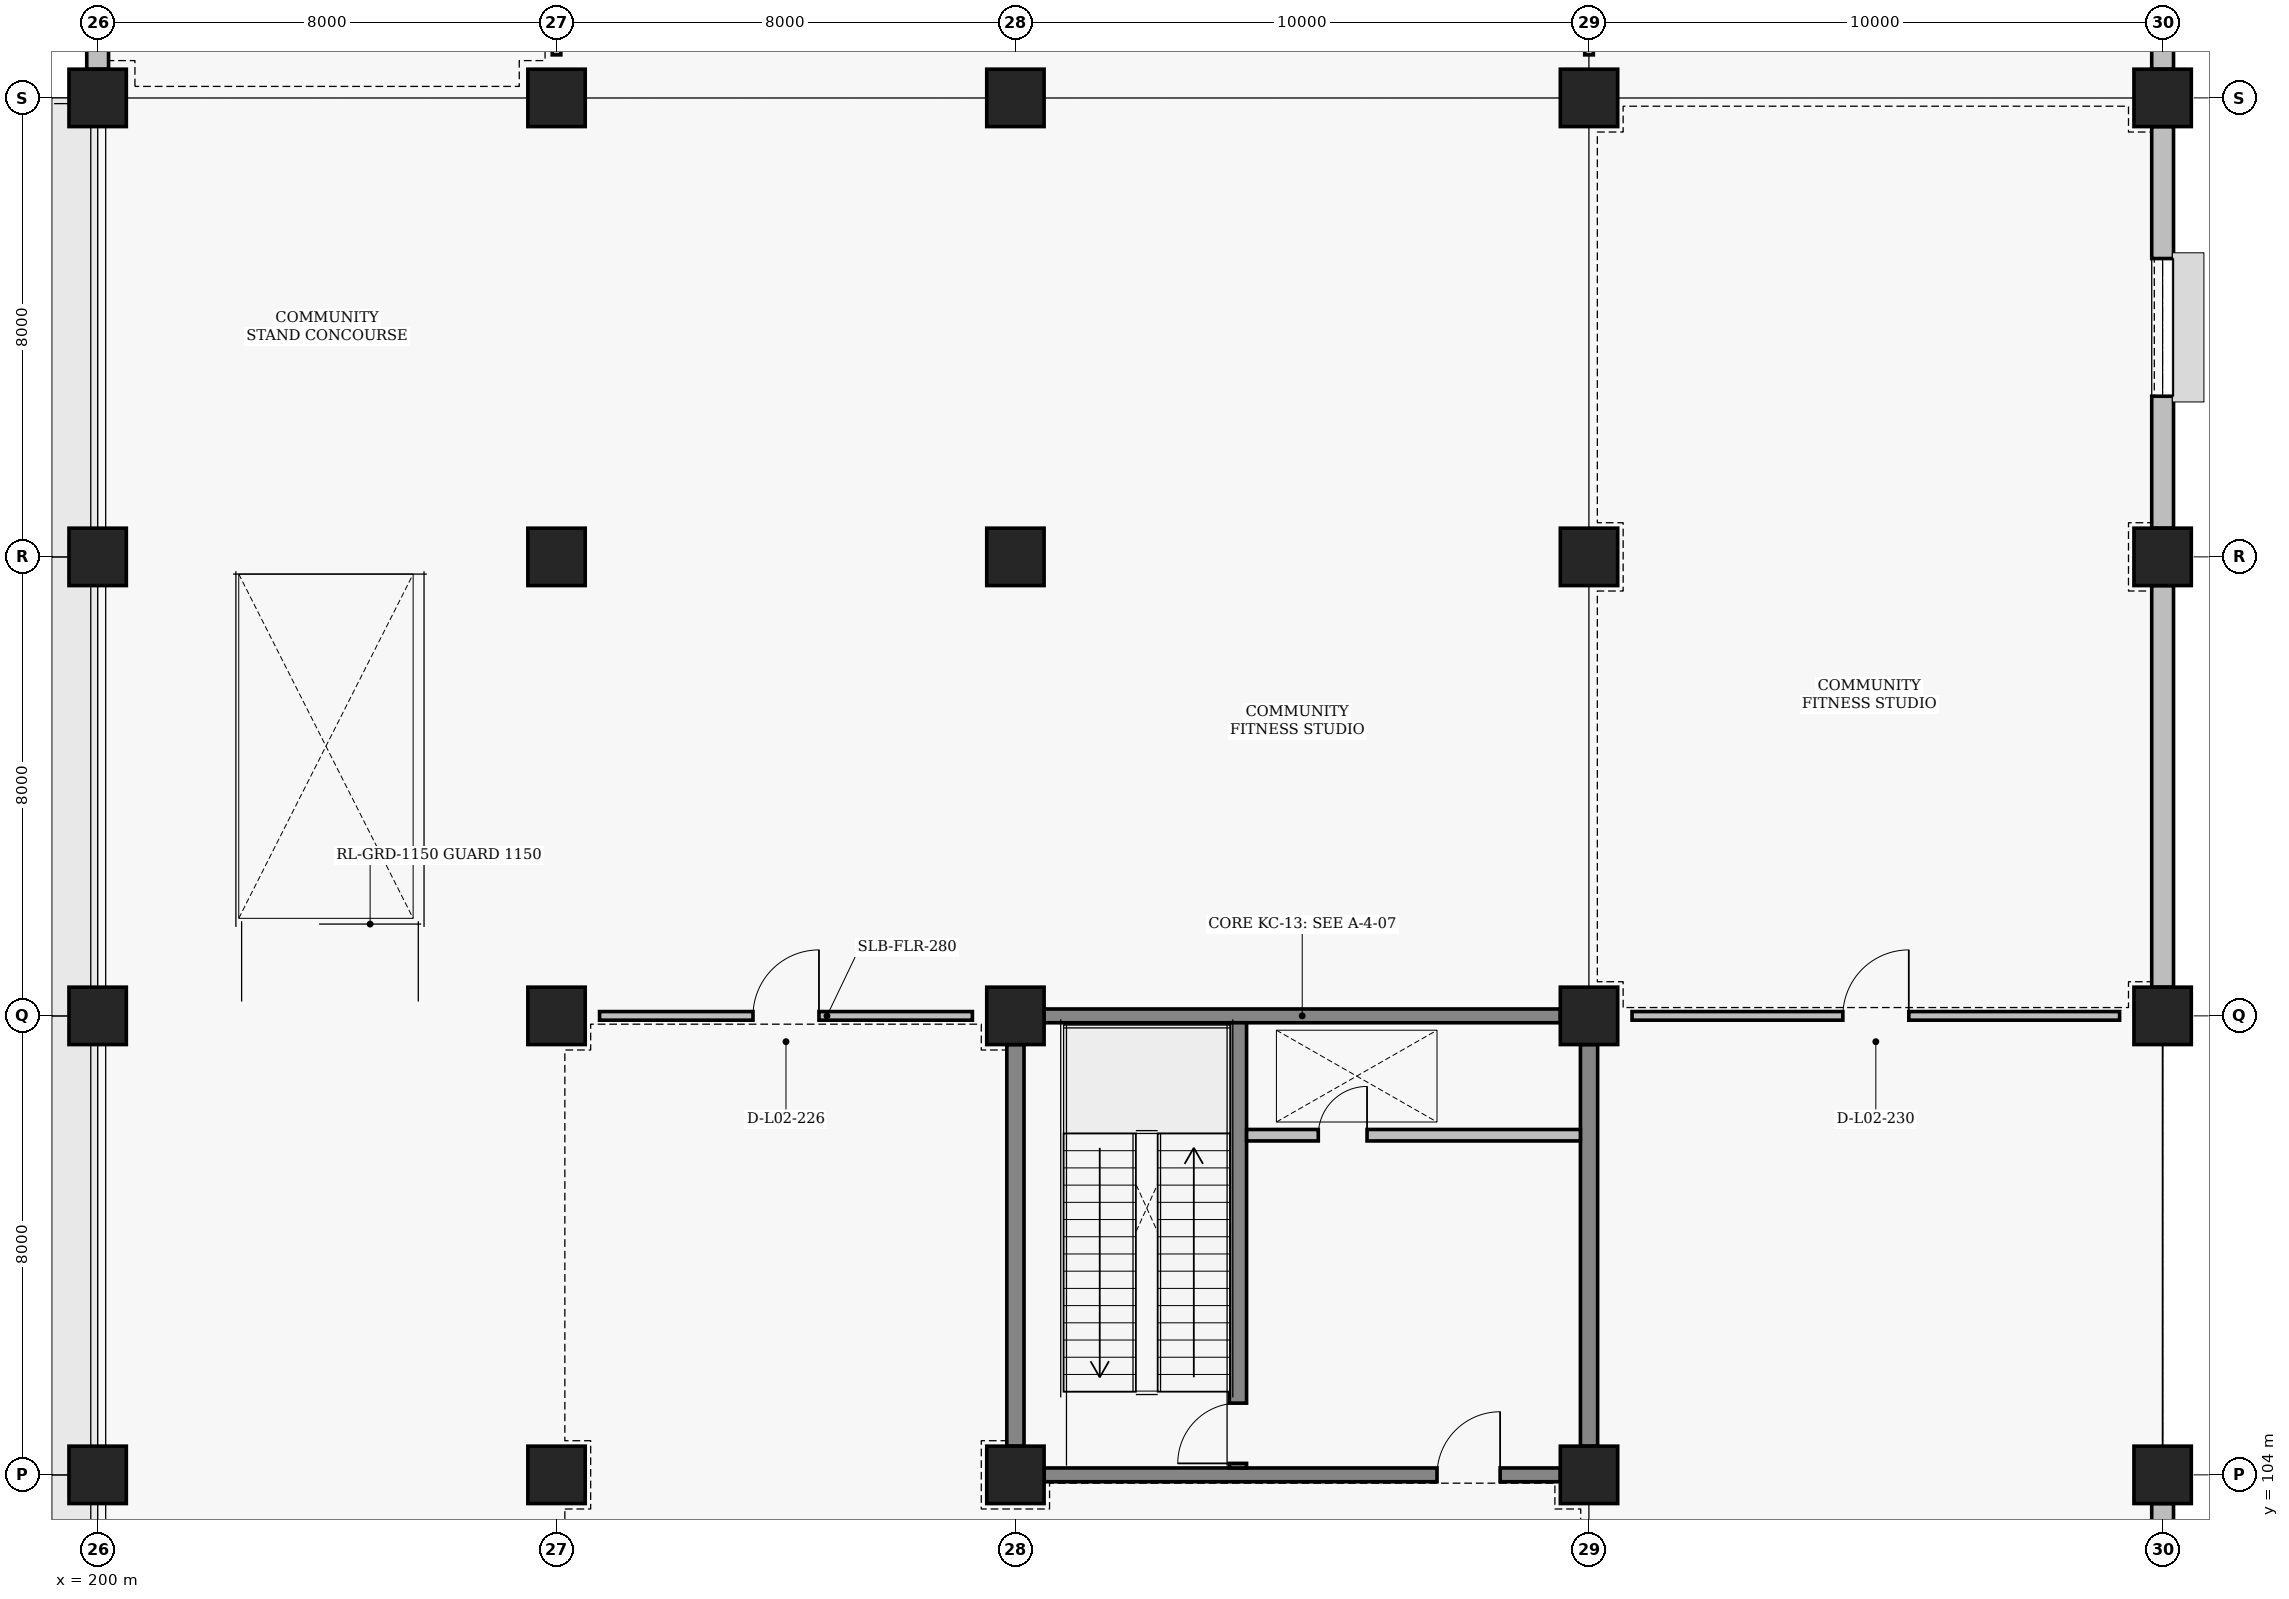
"""IFC4 building model, lengths in metres.
Left out: names, types, materials, properties, quantities, classifications, styles, units other than length and angle.
Written with IfcOpenShell. Run it as: python <this file> out.ifc"""

import sys

from ifc_helpers import new_model, si_unit, direction, frame, frame_2d, origin, origin_2d, place, context, subcontext, project, spatial, rectangle, extrude, element, fill, save


model = new_model("IFC4")
c1 = context("Model", 3, precision=1e-05, world=origin(), true_north=direction((0.0, 1.0)))
c2 = subcontext(c1, "Body", "Model", "MODEL_VIEW")
j1 = project(units=[si_unit("LENGTHUNIT", "METRE"), si_unit("PLANEANGLEUNIT", "RADIAN")], contexts=[c1])
p1 = place(None, origin())
s1 = spatial("IfcSite", under=j1, at=p1, CompositionType="ELEMENT")
p2 = place(p1, origin())
s2 = spatial("IfcBuilding", under=s1, at=p2, CompositionType="ELEMENT")
p3 = place(p2, frame((0.0, 0.0, 4.8)))
s3 = spatial("IfcBuildingStorey", under=s2, at=p3, CompositionType="ELEMENT", Elevation=4.8)
for number, where, z_axis, x_axis in (
    (1, (200.0, 104.0, 0.0), (0.0, 0.0, 1.0), (1.0, 0.0, 0.0)),
    (2, (200.0, 112.0, 0.0), (0.0, 0.0, 1.0), (1.0, 0.0, 0.0)),
    (3, (200.0, 120.0, 0.0), (0.0, 0.0, 1.0), (1.0, 0.0, 0.0)),
    (4, (200.0, 128.0, 0.0), (0.0, 0.0, 1.0), (1.0, 0.0, 0.0)),
    (5, (208.0, 104.0, 0.0), (0.0, 0.0, 1.0), (1.0, 0.0, 0.0)),
    (6, (208.0, 112.0, 0.0), (0.0, 0.0, 1.0), (1.0, 0.0, 0.0)),
    (7, (208.0, 120.0, 0.0), (0.0, 0.0, 1.0), (1.0, 0.0, 0.0)),
    (8, (208.0, 128.0, 0.0), (0.0, 0.0, 1.0), (1.0, 0.0, 0.0)),
    (9, (216.0, 104.0, 0.0), (0.0, 0.0, 1.0), (1.0, 0.0, 0.0)),
    (10, (216.0, 112.0, 0.0), (0.0, 0.0, 1.0), (1.0, 0.0, 0.0)),
    (11, (216.0, 120.0, 0.0), (0.0, 0.0, 1.0), (1.0, 0.0, 0.0)),
    (12, (216.0, 128.0, 0.0), (0.0, 0.0, 1.0), (1.0, 0.0, 0.0)),
    (13, (226.0, 104.0, 0.0), (0.0, 0.0, 1.0), (1.0, 0.0, 0.0)),
    (14, (226.0, 112.0, 0.0), (0.0, 0.0, 1.0), (1.0, 0.0, 0.0)),
    (15, (226.0, 120.0, 0.0), (0.0, 0.0, 1.0), (1.0, 0.0, 0.0)),
    (16, (226.0, 128.0, 0.0), (0.0, 0.0, 1.0), (1.0, 0.0, 0.0)),
    (17, (236.0, 104.0, 0.0), (0.0, 0.0, 1.0), (1.0, 0.0, 0.0)),
    (18, (236.0, 112.0, 0.0), (0.0, 0.0, 1.0), (1.0, 0.0, 0.0)),
    (19, (236.0, 120.0, 0.0), (0.0, 0.0, 1.0), (1.0, 0.0, 0.0)),
    (20, (236.0, 128.0, 0.0), (0.0, 0.0, 1.0), (1.0, 0.0, 0.0)),
):
    element("IfcColumn", number, at=place(p3, frame(where, z_axis=z_axis, x_axis=x_axis)), inside=s3, PredefinedType="COLUMN", context=c2, shape_type="SweptSolid", body=[
        extrude(rectangle(XDim=1.0, YDim=1.0, at=origin_2d()), origin(), (0.0, 0.0, 1.0), 4.8),
    ])
p4 = place(p3, frame((200.0, 128.5, 0.0), z_axis=(0.0, 0.0, 1.0), x_axis=(0.0, 1.0, 0.0)))
e21 = element("IfcWall", 21, at=p4, inside=s3, PredefinedType="SOLIDWALL", context=c2, shape_type="SweptSolid", body=[
    extrude(rectangle(XDim=7.05, YDim=0.38, at=frame_2d((3.525, 0.0))), origin(), (0.0, 0.0, 1.0), 3.61),
])
for number, where, z_axis, x_axis in (
    (22, (236.0, 96.5, 0.0), (0.0, 0.0, 1.0), (0.0, 1.0, 0.0)),
    (23, (236.0, 112.5, 0.0), (0.0, 0.0, 1.0), (0.0, 1.0, 0.0)),
):
    element("IfcWall", number, at=place(p3, frame(where, z_axis=z_axis, x_axis=x_axis)), inside=s3, PredefinedType="SOLIDWALL", context=c2, shape_type="SweptSolid", body=[
        extrude(rectangle(XDim=7.0, YDim=0.38, at=frame_2d((3.5, 0.0))), origin(), (0.0, 0.0, 1.0), 3.81),
    ])
p5 = place(p3, frame((236.0, 120.5, 0.0), z_axis=(0.0, 0.0, 1.0), x_axis=(0.0, 1.0, 0.0)))
e24 = element("IfcWall", 24, at=p5, inside=s3, PredefinedType="SOLIDWALL", context=c2, shape_type="SweptSolid", body=[
    extrude(rectangle(XDim=7.0, YDim=0.38, at=frame_2d((3.5, 0.0))), origin(), (0.0, 0.0, 1.0), 3.81),
])
p6 = place(p5, frame((2.3, 0.0, 1.9)))
e25 = element("IfcOpeningElement", 25, at=p6, cuts=e24, PredefinedType="OPENING", context=c2, shape_type="SweptSolid", body=[
    extrude(rectangle(XDim=2.4, YDim=1.1, at=frame_2d((1.2, 0.55))), frame((0.0, 0.2, 0.0), z_axis=(0.0, -1.0, 0.0), x_axis=(1.0, 0.0, 0.0)), (0.0, 0.0, 1.0), 0.4),
])
p7 = place(p3, frame((236.0, 128.5, 0.0), z_axis=(0.0, 0.0, 1.0), x_axis=(0.0, 1.0, 0.0)))
e26 = element("IfcWall", 26, at=p7, inside=s3, PredefinedType="SOLIDWALL", context=c2, shape_type="SweptSolid", body=[
    extrude(rectangle(XDim=7.0, YDim=0.38, at=frame_2d((3.5, 0.0))), origin(), (0.0, 0.0, 1.0), 3.81),
])
p8 = place(p3, frame((216.5, 104.0, 0.0), z_axis=(0.0, 0.0, 1.0), x_axis=(1.0, 0.0, 0.0)))
e27 = element("IfcWall", 27, at=p8, inside=s3, PredefinedType="SHEAR", context=c2, shape_type="SweptSolid", body=[
    extrude(rectangle(XDim=9.0, YDim=0.24, at=frame_2d((4.5, 0.0))), origin(), (0.0, 0.0, 1.0), 3.81),
])
p9 = place(p8, frame((6.85, 0.0, 0.0)))
e28 = element("IfcOpeningElement", 28, at=p9, cuts=e27, PredefinedType="OPENING", context=c2, shape_type="SweptSolid", body=[
    extrude(rectangle(XDim=1.1, YDim=2.2, at=frame_2d((0.55, 1.1))), frame((0.0, 0.13, 0.0), z_axis=(0.0, -1.0, 0.0), x_axis=(1.0, 0.0, 0.0)), (0.0, 0.0, 1.0), 0.26),
])
p10 = place(p3, frame((216.5, 112.0, 0.0), z_axis=(0.0, 0.0, 1.0), x_axis=(1.0, 0.0, 0.0)))
e29 = element("IfcWall", 29, at=p10, inside=s3, PredefinedType="SHEAR", context=c2, shape_type="SweptSolid", body=[
    extrude(rectangle(XDim=9.0, YDim=0.24, at=frame_2d((4.5, 0.0))), origin(), (0.0, 0.0, 1.0), 3.81),
])
p11 = place(p3, frame((216.0, 104.5, 0.0), z_axis=(0.0, 0.0, 1.0), x_axis=(0.0, 1.0, 0.0)))
e30 = element("IfcWall", 30, at=p11, inside=s3, PredefinedType="SHEAR", context=c2, shape_type="SweptSolid", body=[
    extrude(rectangle(XDim=7.0, YDim=0.3, at=frame_2d((3.5, 0.0))), origin(), (0.0, 0.0, 1.0), 3.91),
])
p12 = place(p3, frame((226.0, 104.5, 0.0), z_axis=(0.0, 0.0, 1.0), x_axis=(0.0, 1.0, 0.0)))
e31 = element("IfcWall", 31, at=p12, inside=s3, PredefinedType="SHEAR", context=c2, shape_type="SweptSolid", body=[
    extrude(rectangle(XDim=7.0, YDim=0.3, at=frame_2d((3.5, 0.0))), origin(), (0.0, 0.0, 1.0), 3.81),
])
p13 = place(p3, frame((219.88, 104.12, 0.0), z_axis=(0.0, 0.0, 1.0), x_axis=(0.0, 1.0, 0.0)))
e32 = element("IfcWall", 32, at=p13, inside=s3, PredefinedType="SHEAR", context=c2, shape_type="SweptSolid", body=[
    extrude(rectangle(XDim=7.76, YDim=0.3, at=frame_2d((3.88, 0.0))), origin(), (0.0, 0.0, 1.0), 4.01),
])
p14 = place(p13, frame((0.08, 0.0, 0.0)))
e33 = element("IfcOpeningElement", 33, at=p14, cuts=e32, PredefinedType="OPENING", context=c2, shape_type="SweptSolid", body=[
    extrude(rectangle(XDim=1.05, YDim=2.15, at=frame_2d((0.525, 1.075))), frame((0.0, 0.16, 0.0), z_axis=(0.0, -1.0, 0.0), x_axis=(1.0, 0.0, 0.0)), (0.0, 0.0, 1.0), 0.32),
])
p15 = place(p3, frame((220.03, 109.92, 0.0), z_axis=(0.0, 0.0, 1.0), x_axis=(1.0, 0.0, 0.0)))
e34 = element("IfcWall", 34, at=p15, inside=s3, PredefinedType="PARTITIONING", context=c2, shape_type="SweptSolid", body=[
    extrude(rectangle(XDim=5.82, YDim=0.2, at=frame_2d((2.91, 0.0))), origin(), (0.0, 0.0, 1.0), 3.91),
])
p16 = place(p15, frame((1.25, 0.0, 0.0)))
e35 = element("IfcOpeningElement", 35, at=p16, cuts=e34, PredefinedType="OPENING", context=c2, shape_type="SweptSolid", body=[
    extrude(rectangle(XDim=0.85, YDim=2.05, at=frame_2d((0.425, 1.025))), frame((0.0, 0.11, 0.0), z_axis=(0.0, -1.0, 0.0), x_axis=(1.0, 0.0, 0.0)), (0.0, 0.0, 1.0), 0.22),
])
p17 = place(p3, frame((208.0, 128.75, 0.0), z_axis=(0.0, 0.0, 1.0), x_axis=(0.0, 1.0, 0.0)))
e36 = element("IfcWall", 36, at=p17, inside=s3, PredefinedType="PARTITIONING", context=c2, shape_type="SweptSolid", body=[
    extrude(rectangle(XDim=6.5, YDim=0.15, at=frame_2d((3.25, 0.0))), origin(), (0.0, 0.0, 1.0), 3.91),
])
p18 = place(p17, frame((2.675, 0.0, 0.0)))
e37 = element("IfcOpeningElement", 37, at=p18, cuts=e36, PredefinedType="OPENING", context=c2, shape_type="SweptSolid", body=[
    extrude(rectangle(XDim=1.15, YDim=2.15, at=frame_2d((0.575, 1.075))), frame((0.0, 0.085, 0.0), z_axis=(0.0, -1.0, 0.0), x_axis=(1.0, 0.0, 0.0)), (0.0, 0.0, 1.0), 0.17),
])
p19 = place(p3, frame((208.75, 112.0, 0.0), z_axis=(0.0, 0.0, 1.0), x_axis=(1.0, 0.0, 0.0)))
e38 = element("IfcWall", 38, at=p19, inside=s3, PredefinedType="PARTITIONING", context=c2, shape_type="SweptSolid", body=[
    extrude(rectangle(XDim=6.5, YDim=0.15, at=frame_2d((3.25, 0.0))), origin(), (0.0, 0.0, 1.0), 3.91),
])
p20 = place(p19, frame((2.675, 0.0, 0.0)))
e39 = element("IfcOpeningElement", 39, at=p20, cuts=e38, PredefinedType="OPENING", context=c2, shape_type="SweptSolid", body=[
    extrude(rectangle(XDim=1.15, YDim=2.15, at=frame_2d((0.575, 1.075))), frame((0.0, 0.085, 0.0), z_axis=(0.0, -1.0, 0.0), x_axis=(1.0, 0.0, 0.0)), (0.0, 0.0, 1.0), 0.17),
])
p21 = place(p3, frame((226.75, 112.0, 0.0), z_axis=(0.0, 0.0, 1.0), x_axis=(1.0, 0.0, 0.0)))
e40 = element("IfcWall", 40, at=p21, inside=s3, PredefinedType="PARTITIONING", context=c2, shape_type="SweptSolid", body=[
    extrude(rectangle(XDim=8.5, YDim=0.15, at=frame_2d((4.25, 0.0))), origin(), (0.0, 0.0, 1.0), 3.81),
])
p22 = place(p21, frame((3.675, 0.0, 0.0)))
e41 = element("IfcOpeningElement", 41, at=p22, cuts=e40, PredefinedType="OPENING", context=c2, shape_type="SweptSolid", body=[
    extrude(rectangle(XDim=1.15, YDim=2.15, at=frame_2d((0.575, 1.075))), frame((0.0, 0.085, 0.0), z_axis=(0.0, -1.0, 0.0), x_axis=(1.0, 0.0, 0.0)), (0.0, 0.0, 1.0), 0.17),
])
p23 = place(p3, frame((226.0, 128.75, 0.0), z_axis=(0.0, 0.0, 1.0), x_axis=(0.0, 1.0, 0.0)))
e42 = element("IfcWall", 42, at=p23, inside=s3, PredefinedType="PARTITIONING", context=c2, shape_type="SweptSolid", body=[
    extrude(rectangle(XDim=6.5, YDim=0.15, at=frame_2d((3.25, 0.0))), origin(), (0.0, 0.0, 1.0), 3.91),
])
p24 = place(p23, frame((2.675, 0.0, 0.0)))
e43 = element("IfcOpeningElement", 43, at=p24, cuts=e42, PredefinedType="OPENING", context=c2, shape_type="SweptSolid", body=[
    extrude(rectangle(XDim=1.15, YDim=2.15, at=frame_2d((0.575, 1.075))), frame((0.0, 0.085, 0.0), z_axis=(0.0, -1.0, 0.0), x_axis=(1.0, 0.0, 0.0)), (0.0, 0.0, 1.0), 0.17),
])
p25 = place(p6, origin())
e44 = element("IfcWindow", 44, at=p25, inside=s3, PartitioningType="SINGLE_PANEL", PredefinedType="LIGHTDOME", context=c2, shape_type="SweptSolid", body=[
    extrude(rectangle(XDim=2.4, YDim=1.1, at=frame_2d((1.2, 0.55))), frame((0.0, 0.03, 0.0), z_axis=(0.0, -1.0, 0.0), x_axis=(1.0, 0.0, 0.0)), (0.0, 0.0, 1.0), 0.06),
])
fill(e25, e44)
p26 = place(p9, origin())
e45 = element("IfcDoor", 45, at=p26, inside=s3, OperationType="SINGLE_SWING_RIGHT", PredefinedType="DOOR", context=c2, shape_type="SweptSolid", body=[
    extrude(rectangle(XDim=1.1, YDim=2.2, at=frame_2d((0.55, 1.1))), frame((0.0, 0.025, 0.0), z_axis=(0.0, -1.0, 0.0), x_axis=(1.0, 0.0, 0.0)), (0.0, 0.0, 1.0), 0.05),
])
fill(e28, e45)
p27 = place(p14, origin())
e46 = element("IfcDoor", 46, at=p27, inside=s3, OperationType="SINGLE_SWING_LEFT", PredefinedType="DOOR", context=c2, shape_type="SweptSolid", body=[
    extrude(rectangle(XDim=1.05, YDim=2.15, at=frame_2d((0.525, 1.075))), frame((0.0, 0.025, 0.0), z_axis=(0.0, -1.0, 0.0), x_axis=(1.0, 0.0, 0.0)), (0.0, 0.0, 1.0), 0.05),
])
fill(e33, e46)
p28 = place(p16, origin())
e47 = element("IfcDoor", 47, at=p28, inside=s3, OperationType="SINGLE_SWING_RIGHT", PredefinedType="TRAPDOOR", context=c2, shape_type="SweptSolid", body=[
    extrude(rectangle(XDim=0.85, YDim=2.05, at=frame_2d((0.425, 1.025))), frame((0.0, 0.025, 0.0), z_axis=(0.0, -1.0, 0.0), x_axis=(1.0, 0.0, 0.0)), (0.0, 0.0, 1.0), 0.05),
])
fill(e35, e47)
p29 = place(p20, origin())
e48 = element("IfcDoor", 48, at=p29, inside=s3, OperationType="SINGLE_SWING_RIGHT", PredefinedType="DOOR", context=c2, shape_type="SweptSolid", body=[
    extrude(rectangle(XDim=1.15, YDim=2.15, at=frame_2d((0.575, 1.075))), frame((0.0, 0.025, 0.0), z_axis=(0.0, -1.0, 0.0), x_axis=(1.0, 0.0, 0.0)), (0.0, 0.0, 1.0), 0.05),
])
fill(e39, e48)
p30 = place(p22, origin())
e49 = element("IfcDoor", 49, at=p30, inside=s3, OperationType="SINGLE_SWING_RIGHT", PredefinedType="DOOR", context=c2, shape_type="SweptSolid", body=[
    extrude(rectangle(XDim=1.15, YDim=2.15, at=frame_2d((0.575, 1.075))), frame((0.0, 0.025, 0.0), z_axis=(0.0, -1.0, 0.0), x_axis=(1.0, 0.0, 0.0)), (0.0, 0.0, 1.0), 0.05),
])
fill(e41, e49)
save(model, sys.argv[1])
